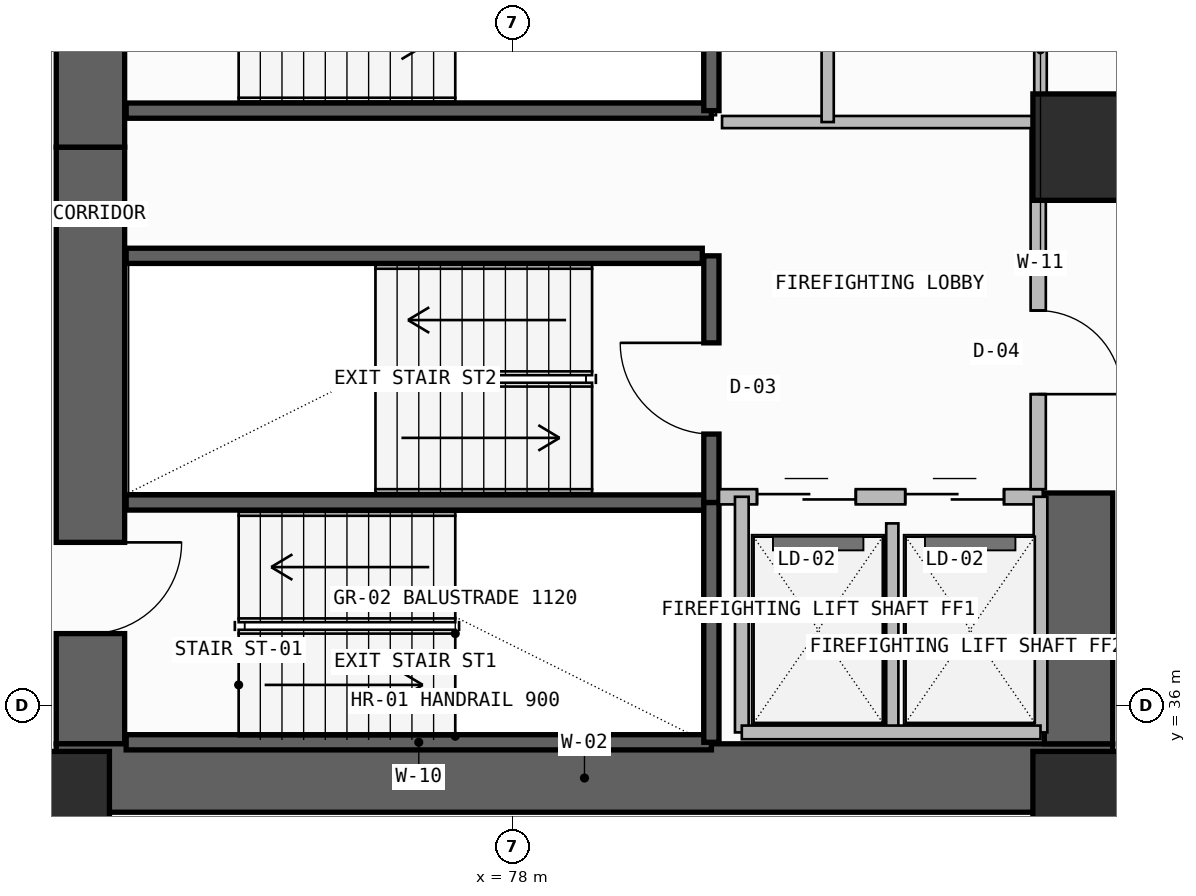
"""IFC4 building model, lengths in metres.
Left out: names, types, materials, properties, quantities, classifications, styles, units other than length and angle.
Written with IfcOpenShell. Run it as: python <this file> out.ifc"""

import sys

from ifc_helpers import new_model, si_unit, direction, frame, frame_2d, origin, origin_2d, place, context, subcontext, project, spatial, rectangle, extrude, element, fill, save


model = new_model("IFC4")
c1 = context("Model", 3, precision=1e-05, world=origin(), true_north=direction((0.0, 1.0)))
c2 = subcontext(c1, "Body", "Model", "MODEL_VIEW")
j1 = project(units=[si_unit("LENGTHUNIT", "METRE"), si_unit("PLANEANGLEUNIT", "RADIAN")], contexts=[c1])
p1 = place(None, origin())
s1 = spatial("IfcSite", under=j1, at=p1, CompositionType="ELEMENT")
p2 = place(p1, origin())
s2 = spatial("IfcBuilding", under=s1, at=p2, CompositionType="ELEMENT")
p3 = place(p2, frame((0.0, 0.0, 106.5)))
s3 = spatial("IfcBuildingStorey", under=s2, at=p3, CompositionType="ELEMENT", Elevation=106.5)
p4 = place(p3, frame((72.45, 35.5, -0.26), z_axis=(0.0, 0.0, 1.0), x_axis=(0.0, 1.0, 0.0)))
e1 = element("IfcWall", 1, at=p4, inside=s3, PredefinedType="SHEAR", context=c2, shape_type="SweptSolid", body=[
    extrude(rectangle(XDim=7.85, YDim=0.9, at=frame_2d((3.925, 0.0))), origin(), (0.0, 0.0, 1.0), 3.6),
])
p5 = place(p4, frame((1.45, 0.0, 0.26)))
e2 = element("IfcOpeningElement", 2, at=p5, cuts=e1, PredefinedType="OPENING", context=c2, shape_type="SweptSolid", body=[
    extrude(rectangle(XDim=1.2, YDim=2.2, at=frame_2d((0.6, 1.1))), frame((0.0, 0.46, 0.0), z_axis=(0.0, -1.0, 0.0), x_axis=(1.0, 0.0, 0.0)), (0.0, 0.0, 1.0), 0.92),
])
p6 = place(p3, frame((72.0, 35.05, -0.26), z_axis=(0.0, 0.0, 1.0), x_axis=(1.0, 0.0, 0.0)))
e3 = element("IfcWall", 3, at=p6, inside=s3, PredefinedType="SHEAR", context=c2, shape_type="SweptSolid", body=[
    extrude(rectangle(XDim=13.9, YDim=0.9, at=frame_2d((6.95, 0.0))), origin(), (0.0, 0.0, 1.0), 3.6),
])
p7 = place(p3, frame((85.45, 35.5, -0.26), z_axis=(0.0, 0.0, 1.0), x_axis=(0.0, 1.0, 0.0)))
e4 = element("IfcWall", 4, at=p7, inside=s3, PredefinedType="SHEAR", context=c2, shape_type="SweptSolid", body=[
    extrude(rectangle(XDim=3.3, YDim=0.9, at=frame_2d((1.65, 0.0))), origin(), (0.0, 0.0, 1.0), 3.6),
])
p8 = place(p3, frame((72.45, 43.35, -0.26), z_axis=(0.0, 0.0, 1.0), x_axis=(0.0, 1.0, 0.0)))
e5 = element("IfcWall", 5, at=p8, inside=s3, PredefinedType="SHEAR", context=c2, shape_type="SweptSolid", body=[
    extrude(rectangle(XDim=12.7, YDim=0.9, at=frame_2d((6.35, 0.0))), origin(), (0.0, 0.0, 1.0), 3.6),
])
p9 = place(p8, frame((1.35, 0.0, 0.26)))
e6 = element("IfcOpeningElement", 6, at=p9, cuts=e5, PredefinedType="OPENING", context=c2, shape_type="SweptSolid", body=[
    extrude(rectangle(XDim=1.2, YDim=2.2, at=frame_2d((0.6, 1.1))), frame((0.0, 0.46, 0.0), z_axis=(0.0, -1.0, 0.0), x_axis=(1.0, 0.0, 0.0)), (0.0, 0.0, 1.0), 0.92),
])
for number, where, z_axis, x_axis in (
    (7, (72.0, 34.7, 0.0), (0.0, 0.0, 1.0), (1.0, 0.0, 0.0)),
    (8, (85.55, 34.7, 0.0), (0.0, 0.0, 1.0), (1.0, 0.0, 0.0)),
    (9, (85.55, 43.35, 0.0), (0.0, 0.0, 1.0), (1.0, 0.0, 0.0)),
):
    element("IfcColumn", number, at=place(p3, frame(where, z_axis=z_axis, x_axis=x_axis)), inside=s3, PredefinedType="COLUMN", context=c2, shape_type="SweptSolid", body=[
        extrude(rectangle(XDim=1.4, YDim=1.4, at=origin_2d()), origin(), (0.0, 0.0, 1.0), 3.6),
    ])
for number, where, z_axis, x_axis in (
    (10, (72.92, 35.52, -0.26), (0.0, 0.0, 1.0), (1.0, 0.0, 0.0)),
    (11, (72.92, 38.675, -0.26), (0.0, 0.0, 1.0), (1.0, 0.0, 0.0)),
):
    element("IfcWall", number, at=place(p3, frame(where, z_axis=z_axis, x_axis=x_axis)), inside=s3, PredefinedType="SOLIDWALL", context=c2, shape_type="SweptSolid", body=[
        extrude(rectangle(XDim=7.7, YDim=0.2, at=frame_2d((3.85, 0.0))), origin(), (0.0, 0.0, 1.0), 3.6),
    ])
p10 = place(p3, frame((80.62, 35.52, -0.26), z_axis=(0.0, 0.0, 1.0), x_axis=(0.0, 1.0, 0.0)))
e12 = element("IfcWall", 12, at=p10, inside=s3, PredefinedType="SOLIDWALL", context=c2, shape_type="SweptSolid", body=[
    extrude(rectangle(XDim=3.155, YDim=0.2, at=frame_2d((1.578, 0.0))), origin(), (0.0, 0.0, 1.0), 3.6),
])
p11 = place(p3, frame((80.62, 38.675, -0.26), z_axis=(0.0, 0.0, 1.0), x_axis=(0.0, 1.0, 0.0)))
e13 = element("IfcWall", 13, at=p11, inside=s3, PredefinedType="SOLIDWALL", context=c2, shape_type="SweptSolid", body=[
    extrude(rectangle(XDim=3.245, YDim=0.2, at=frame_2d((1.623, 0.0))), origin(), (0.0, 0.0, 1.0), 3.6),
])
p12 = place(p11, frame((0.9, 0.0, 0.26)))
e14 = element("IfcOpeningElement", 14, at=p12, cuts=e13, PredefinedType="OPENING", context=c2, shape_type="SweptSolid", body=[
    extrude(rectangle(XDim=1.2, YDim=2.2, at=frame_2d((0.6, 1.1))), frame((0.0, 0.11, 0.0), z_axis=(0.0, -1.0, 0.0), x_axis=(1.0, 0.0, 0.0)), (0.0, 0.0, 1.0), 0.22),
])
p13 = place(p3, frame((80.72, 38.75, 0.0), z_axis=(0.0, 0.0, 1.0), x_axis=(1.0, 0.0, 0.0)))
e15 = element("IfcWall", 15, at=p13, inside=s3, PredefinedType="SOLIDWALL", context=c2, shape_type="SweptSolid", body=[
    extrude(rectangle(XDim=4.26, YDim=0.2, at=frame_2d((2.13, 0.0))), origin(), (0.0, 0.0, 1.0), 3.34),
])
p14 = place(p13, frame((0.5, 0.0, 0.0)))
e16 = element("IfcOpeningElement", 16, at=p14, cuts=e15, PredefinedType="OPENING", context=c2, shape_type="SweptSolid", body=[
    extrude(rectangle(XDim=1.3, YDim=2.3, at=frame_2d((0.65, 1.15))), frame((0.0, 0.11, 0.0), z_axis=(0.0, -1.0, 0.0), x_axis=(1.0, 0.0, 0.0)), (0.0, 0.0, 1.0), 0.22),
])
p15 = place(p13, frame((2.45, 0.0, 0.0)))
e17 = element("IfcOpeningElement", 17, at=p15, cuts=e15, PredefinedType="OPENING", context=c2, shape_type="SweptSolid", body=[
    extrude(rectangle(XDim=1.3, YDim=2.3, at=frame_2d((0.65, 1.15))), frame((0.0, 0.11, 0.0), z_axis=(0.0, -1.0, 0.0), x_axis=(1.0, 0.0, 0.0)), (0.0, 0.0, 1.0), 0.22),
])
p16 = place(p3, frame((83.0, 35.65, 0.0), z_axis=(0.0, 0.0, 1.0), x_axis=(0.0, 1.0, 0.0)))
e18 = element("IfcWall", 18, at=p16, inside=s3, PredefinedType="PLUMBINGWALL", context=c2, shape_type="SweptSolid", body=[
    extrude(rectangle(XDim=2.75, YDim=0.16, at=frame_2d((1.375, 0.0))), origin(), (0.0, 0.0, 1.0), 3.34),
])
for number, where, z_axis, x_axis in (
    (19, (84.95, 35.65, 0.0), (0.0, 0.0, 1.0), (0.0, 1.0, 0.0)),
    (20, (81.02, 35.65, 0.0), (0.0, 0.0, 1.0), (0.0, 1.0, 0.0)),
):
    element("IfcWall", number, at=place(p3, frame(where, z_axis=z_axis, x_axis=x_axis)), inside=s3, PredefinedType="SOLIDWALL", context=c2, shape_type="SweptSolid", body=[
        extrude(rectangle(XDim=3.1, YDim=0.18, at=frame_2d((1.55, 0.0))), origin(), (0.0, 0.0, 1.0), 3.34),
    ])
p17 = place(p3, frame((81.02, 35.65, 0.0), z_axis=(0.0, 0.0, 1.0), x_axis=(1.0, 0.0, 0.0)))
e21 = element("IfcWall", 21, at=p17, inside=s3, PredefinedType="SOLIDWALL", context=c2, shape_type="SweptSolid", body=[
    extrude(rectangle(XDim=3.93, YDim=0.18, at=frame_2d((1.965, 0.0))), origin(), (0.0, 0.0, 1.0), 3.34),
])
p18 = place(p3, frame((84.92, 38.85, 0.0), z_axis=(0.0, 0.0, 1.0), x_axis=(0.0, 1.0, 0.0)))
e22 = element("IfcWall", 22, at=p18, inside=s3, PredefinedType="SOLIDWALL", context=c2, shape_type="SweptSolid", body=[
    extrude(rectangle(XDim=4.83, YDim=0.2, at=frame_2d((2.415, 0.0))), origin(), (0.0, 0.0, 1.0), 3.34),
])
p19 = place(p18, frame((1.25, 0.0, 0.0)))
e23 = element("IfcOpeningElement", 23, at=p19, cuts=e22, PredefinedType="OPENING", context=c2, shape_type="SweptSolid", body=[
    extrude(rectangle(XDim=1.1, YDim=2.2, at=frame_2d((0.55, 1.1))), frame((0.0, 0.11, 0.0), z_axis=(0.0, -1.0, 0.0), x_axis=(1.0, 0.0, 0.0)), (0.0, 0.0, 1.0), 0.22),
])
p20 = place(p3, frame((72.92, 41.92, -0.26), z_axis=(0.0, 0.0, 1.0), x_axis=(1.0, 0.0, 0.0)))
e24 = element("IfcWall", 24, at=p20, inside=s3, PredefinedType="SOLIDWALL", context=c2, shape_type="SweptSolid", body=[
    extrude(rectangle(XDim=7.58, YDim=0.2, at=frame_2d((3.79, 0.0))), origin(), (0.0, 0.0, 1.0), 3.6),
])
p21 = place(p3, frame((72.92, 43.83, -0.26), z_axis=(0.0, 0.0, 1.0), x_axis=(1.0, 0.0, 0.0)))
e25 = element("IfcWall", 25, at=p21, inside=s3, PredefinedType="SOLIDWALL", context=c2, shape_type="SweptSolid", body=[
    extrude(rectangle(XDim=7.7, YDim=0.2, at=frame_2d((3.85, 0.0))), origin(), (0.0, 0.0, 1.0), 3.6),
])
p22 = place(p3, frame((80.62, 43.83, -0.26), z_axis=(0.0, 0.0, 1.0), x_axis=(0.0, 1.0, 0.0)))
e26 = element("IfcWall", 26, at=p22, inside=s3, PredefinedType="SOLIDWALL", context=c2, shape_type="SweptSolid", body=[
    extrude(rectangle(XDim=3.24, YDim=0.2, at=frame_2d((1.62, 0.0))), origin(), (0.0, 0.0, 1.0), 3.6),
])
p23 = place(p3, frame((84.95, 43.68, 0.0), z_axis=(0.0, 0.0, 1.0), x_axis=(0.0, 1.0, 0.0)))
e27 = element("IfcWall", 27, at=p23, inside=s3, PredefinedType="PLUMBINGWALL", context=c2, shape_type="SweptSolid", body=[
    extrude(rectangle(XDim=1.9, YDim=0.165, at=frame_2d((0.95, 0.0))), origin(), (0.0, 0.0, 1.0), 3.34),
])
p24 = place(p3, frame((80.76, 43.68, 0.0), z_axis=(0.0, 0.0, 1.0), x_axis=(1.0, 0.0, 0.0)))
e28 = element("IfcWall", 28, at=p24, inside=s3, PredefinedType="PLUMBINGWALL", context=c2, shape_type="SweptSolid", body=[
    extrude(rectangle(XDim=4.19, YDim=0.16, at=frame_2d((2.095, 0.0))), origin(), (0.0, 0.0, 1.0), 3.34),
])
p25 = place(p3, frame((82.15, 43.68, 0.0), z_axis=(0.0, 0.0, 1.0), x_axis=(0.0, 1.0, 0.0)))
e29 = element("IfcWall", 29, at=p25, inside=s3, PredefinedType="PLUMBINGWALL", context=c2, shape_type="SweptSolid", body=[
    extrude(rectangle(XDim=1.9, YDim=0.16, at=frame_2d((0.95, 0.0))), origin(), (0.0, 0.0, 1.0), 3.34),
])
p26 = place(p5, frame((1.2, 0.0, 0.0), z_axis=(0.0, 0.0, 1.0), x_axis=(-1.0, 0.0, 0.0)))
e30 = element("IfcDoor", 30, at=p26, inside=s3, OperationType="SINGLE_SWING_LEFT", PredefinedType="USERDEFINED", context=c2, shape_type="SweptSolid", body=[
    extrude(rectangle(XDim=1.2, YDim=2.2, at=frame_2d((0.6, 1.1))), frame((0.0, 0.025, 0.0), z_axis=(0.0, -1.0, 0.0), x_axis=(1.0, 0.0, 0.0)), (0.0, 0.0, 1.0), 0.05),
])
fill(e2, e30)
p27 = place(p12, origin())
e31 = element("IfcDoor", 31, at=p27, inside=s3, OperationType="SINGLE_SWING_RIGHT", PredefinedType="USERDEFINED", context=c2, shape_type="SweptSolid", body=[
    extrude(rectangle(XDim=1.2, YDim=2.2, at=frame_2d((0.6, 1.1))), frame((0.0, 0.025, 0.0), z_axis=(0.0, -1.0, 0.0), x_axis=(1.0, 0.0, 0.0)), (0.0, 0.0, 1.0), 0.05),
])
fill(e14, e31)
p28 = place(p14, origin())
e32 = element("IfcDoor", 32, at=p28, inside=s3, OperationType="DOUBLE_DOOR_SLIDING", PredefinedType="DOOR", context=c2, shape_type="SweptSolid", body=[
    extrude(rectangle(XDim=1.3, YDim=2.3, at=frame_2d((0.65, 1.15))), frame((0.0, 0.025, 0.0), z_axis=(0.0, -1.0, 0.0), x_axis=(1.0, 0.0, 0.0)), (0.0, 0.0, 1.0), 0.05),
])
fill(e16, e32)
p29 = place(p15, origin())
e33 = element("IfcDoor", 33, at=p29, inside=s3, OperationType="DOUBLE_DOOR_SLIDING", PredefinedType="DOOR", context=c2, shape_type="SweptSolid", body=[
    extrude(rectangle(XDim=1.3, YDim=2.3, at=frame_2d((0.65, 1.15))), frame((0.0, 0.025, 0.0), z_axis=(0.0, -1.0, 0.0), x_axis=(1.0, 0.0, 0.0)), (0.0, 0.0, 1.0), 0.05),
])
fill(e17, e33)
p30 = place(p19, frame((1.1, 0.0, 0.0), z_axis=(0.0, 0.0, 1.0), x_axis=(-1.0, 0.0, 0.0)))
e34 = element("IfcDoor", 34, at=p30, inside=s3, OperationType="SINGLE_SWING_RIGHT", PredefinedType="DOOR", context=c2, shape_type="SweptSolid", body=[
    extrude(rectangle(XDim=1.1, YDim=2.2, at=frame_2d((0.55, 1.1))), frame((0.0, 0.025, 0.0), z_axis=(0.0, -1.0, 0.0), x_axis=(1.0, 0.0, 0.0)), (0.0, 0.0, 1.0), 0.05),
])
fill(e23, e34)
save(model, sys.argv[1])
